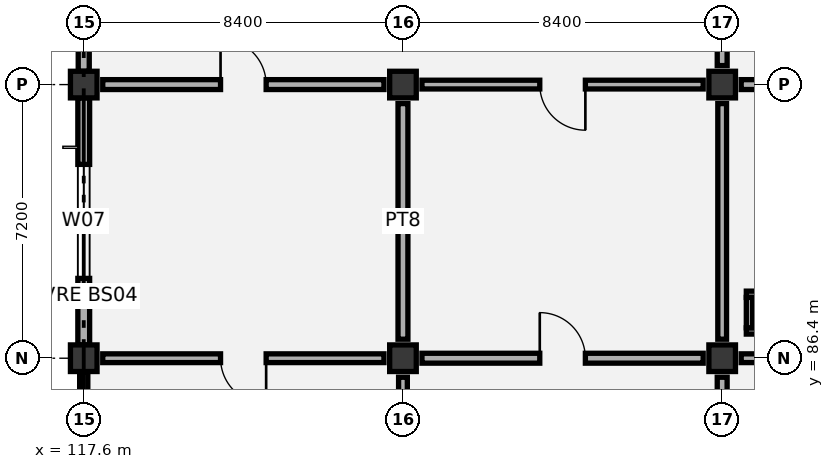
"""IFC4 building model, lengths in metres.
Left out: names, types, materials, properties, quantities, classifications, styles, units other than length and angle.
Written with IfcOpenShell. Run it as: python <this file> out.ifc"""

import sys

from ifc_helpers import new_model, si_unit, direction, frame, frame_2d, origin, origin_2d, place, context, subcontext, project, spatial, rectangle, extrude, element, fill, save


model = new_model("IFC4")
c1 = context("Model", 3, precision=1e-05, world=origin(), true_north=direction((0.0, 1.0)))
c2 = subcontext(c1, "Body", "Model", "MODEL_VIEW")
j1 = project(units=[si_unit("LENGTHUNIT", "METRE"), si_unit("PLANEANGLEUNIT", "RADIAN")], contexts=[c1])
p1 = place(None, origin())
s1 = spatial("IfcSite", under=j1, at=p1, CompositionType="ELEMENT")
p2 = place(p1, origin())
s2 = spatial("IfcBuilding", under=s1, at=p2, CompositionType="ELEMENT")
p3 = place(p2, origin())
s3 = spatial("IfcBuildingStorey", under=s2, at=p3, CompositionType="ELEMENT", Elevation=0.0)
for number, where, z_axis, x_axis in (
    (1, (117.6, 86.4, 0.0), (0.0, 0.0, 1.0), (1.0, 0.0, 0.0)),
    (2, (117.6, 93.6, 0.0), (0.0, 0.0, 1.0), (1.0, 0.0, 0.0)),
    (3, (126.0, 86.4, 0.0), (0.0, 0.0, 1.0), (1.0, 0.0, 0.0)),
    (4, (126.0, 93.6, 0.0), (0.0, 0.0, 1.0), (1.0, 0.0, 0.0)),
    (5, (134.4, 86.4, 0.0), (0.0, 0.0, 1.0), (1.0, 0.0, 0.0)),
    (6, (134.4, 93.6, 0.0), (0.0, 0.0, 1.0), (1.0, 0.0, 0.0)),
):
    element("IfcColumn", number, at=place(p3, frame(where, z_axis=z_axis, x_axis=x_axis)), inside=s3, PredefinedType="COLUMN", context=c2, shape_type="SweptSolid", body=[
        extrude(rectangle(XDim=0.7, YDim=0.7, at=origin_2d()), origin(), (0.0, 0.0, 1.0), 6.0),
    ])
p4 = place(p3, frame((117.6, 79.55, 0.0), z_axis=(0.0, 0.0, 1.0), x_axis=(0.0, 1.0, 0.0)))
e7 = element("IfcWall", 7, at=p4, inside=s3, PredefinedType="SOLIDWALL", context=c2, shape_type="SweptSolid", body=[
    extrude(rectangle(XDim=6.5, YDim=0.215, at=frame_2d((3.25, 0.0))), origin(), (0.0, 0.0, 1.0), 5.02),
])
p5 = place(p4, frame((0.967, 0.0, 0.9)))
e8 = element("IfcOpeningElement", 8, at=p5, cuts=e7, PredefinedType="OPENING", context=c2, shape_type="SweptSolid", body=[
    extrude(rectangle(XDim=1.8, YDim=2.1, at=frame_2d((0.9, 1.05))), frame((0.0, 0.117, 0.0), z_axis=(0.0, -1.0, 0.0), x_axis=(1.0, 0.0, 0.0)), (0.0, 0.0, 1.0), 0.235),
])
p6 = place(p4, frame((3.733, 0.0, 0.9)))
e9 = element("IfcOpeningElement", 9, at=p6, cuts=e7, PredefinedType="OPENING", context=c2, shape_type="SweptSolid", body=[
    extrude(rectangle(XDim=1.8, YDim=2.1, at=frame_2d((0.9, 1.05))), frame((0.0, 0.117, 0.0), z_axis=(0.0, -1.0, 0.0), x_axis=(1.0, 0.0, 0.0)), (0.0, 0.0, 1.0), 0.235),
])
p7 = place(p3, frame((117.6, 86.75, 0.0), z_axis=(0.0, 0.0, 1.0), x_axis=(0.0, 1.0, 0.0)))
e10 = element("IfcWall", 10, at=p7, inside=s3, PredefinedType="SOLIDWALL", context=c2, shape_type="SweptSolid", body=[
    extrude(rectangle(XDim=6.5, YDim=0.31, at=frame_2d((3.25, 0.0))), origin(), (0.0, 0.0, 1.0), 5.02),
])
p8 = place(p7, frame((1.75, 0.0, 0.9)))
e11 = element("IfcOpeningElement", 11, at=p8, cuts=e10, PredefinedType="OPENING", context=c2, shape_type="SweptSolid", body=[
    extrude(rectangle(XDim=3.0, YDim=2.1, at=frame_2d((1.5, 1.05))), frame((0.0, 0.165, 0.0), z_axis=(0.0, -1.0, 0.0), x_axis=(1.0, 0.0, 0.0)), (0.0, 0.0, 1.0), 0.33),
])
p9 = place(p3, frame((117.6, 93.95, 0.0), z_axis=(0.0, 0.0, 1.0), x_axis=(0.0, 1.0, 0.0)))
e12 = element("IfcWall", 12, at=p9, inside=s3, PredefinedType="SOLIDWALL", context=c2, shape_type="SweptSolid", body=[
    extrude(rectangle(XDim=6.5, YDim=0.29, at=frame_2d((3.25, 0.0))), origin(), (0.0, 0.0, 1.0), 5.12),
])
p10 = place(p9, frame((1.75, 0.0, 0.9)))
e13 = element("IfcOpeningElement", 13, at=p10, cuts=e12, PredefinedType="OPENING", context=c2, shape_type="SweptSolid", body=[
    extrude(rectangle(XDim=3.0, YDim=2.4, at=frame_2d((1.5, 1.2))), frame((0.0, 0.155, 0.0), z_axis=(0.0, -1.0, 0.0), x_axis=(1.0, 0.0, 0.0)), (0.0, 0.0, 1.0), 0.31),
])
for number, where, z_axis, x_axis in (
    (14, (135.035, 87.117, 0.0), (0.0, 0.0, 1.0), (1.0, 0.0, 0.0)),
    (15, (135.035, 88.083, 0.0), (0.0, 0.0, 1.0), (1.0, 0.0, 0.0)),
):
    element("IfcWall", number, at=place(p3, frame(where, z_axis=z_axis, x_axis=x_axis)), inside=s3, PredefinedType="PARTITIONING", context=c2, shape_type="SweptSolid", body=[
        extrude(rectangle(XDim=1.43, YDim=0.165, at=frame_2d((0.715, 0.0))), origin(), (0.0, 0.0, 1.0), 5.675),
    ])
p11 = place(p3, frame((135.117, 87.2, 0.0), z_axis=(0.0, 0.0, 1.0), x_axis=(0.0, 1.0, 0.0)))
e16 = element("IfcWall", 16, at=p11, inside=s3, PredefinedType="PARTITIONING", context=c2, shape_type="SweptSolid", body=[
    extrude(rectangle(XDim=0.8, YDim=0.165, at=frame_2d((0.4, 0.0))), origin(), (0.0, 0.0, 1.0), 5.675),
])
p12 = place(p3, frame((126.0, 79.7, 0.0), z_axis=(0.0, 0.0, 1.0), x_axis=(0.0, 1.0, 0.0)))
e17 = element("IfcWall", 17, at=p12, inside=s3, PredefinedType="PARTITIONING", context=c2, shape_type="SweptSolid", body=[
    extrude(rectangle(XDim=6.2, YDim=0.23, at=frame_2d((3.1, 0.0))), origin(), (0.0, 0.0, 1.0), 5.38),
])
p13 = place(p3, frame((118.1, 86.4, 0.0), z_axis=(0.0, 0.0, 1.0), x_axis=(1.0, 0.0, 0.0)))
e18 = element("IfcWall", 18, at=p13, inside=s3, PredefinedType="PARTITIONING", context=c2, shape_type="SweptSolid", body=[
    extrude(rectangle(XDim=7.4, YDim=0.23, at=frame_2d((3.7, 0.0))), origin(), (0.0, 0.0, 1.0), 4.87),
])
p14 = place(p13, frame((3.1, 0.0, 0.0)))
e19 = element("IfcOpeningElement", 19, at=p14, cuts=e18, PredefinedType="OPENING", context=c2, shape_type="SweptSolid", body=[
    extrude(rectangle(XDim=1.2, YDim=2.1, at=frame_2d((0.6, 1.05))), frame((0.0, 0.125, 0.0), z_axis=(0.0, -1.0, 0.0), x_axis=(1.0, 0.0, 0.0)), (0.0, 0.0, 1.0), 0.25),
])
p15 = place(p3, frame((126.0, 86.9, 0.0), z_axis=(0.0, 0.0, 1.0), x_axis=(0.0, 1.0, 0.0)))
e20 = element("IfcWall", 20, at=p15, inside=s3, PredefinedType="PARTITIONING", context=c2, shape_type="SweptSolid", body=[
    extrude(rectangle(XDim=6.2, YDim=0.26, at=frame_2d((3.1, 0.0))), origin(), (0.0, 0.0, 1.0), 4.92),
])
p16 = place(p3, frame((118.1, 93.6, 0.0), z_axis=(0.0, 0.0, 1.0), x_axis=(1.0, 0.0, 0.0)))
e21 = element("IfcWall", 21, at=p16, inside=s3, PredefinedType="PARTITIONING", context=c2, shape_type="SweptSolid", body=[
    extrude(rectangle(XDim=7.4, YDim=0.26, at=frame_2d((3.7, 0.0))), origin(), (0.0, 0.0, 1.0), 4.87),
])
p17 = place(p16, frame((3.1, 0.0, 0.0)))
e22 = element("IfcOpeningElement", 22, at=p17, cuts=e21, PredefinedType="OPENING", context=c2, shape_type="SweptSolid", body=[
    extrude(rectangle(XDim=1.2, YDim=2.1, at=frame_2d((0.6, 1.05))), frame((0.0, 0.14, 0.0), z_axis=(0.0, -1.0, 0.0), x_axis=(1.0, 0.0, 0.0)), (0.0, 0.0, 1.0), 0.28),
])
p18 = place(p3, frame((134.4, 79.7, 0.0), z_axis=(0.0, 0.0, 1.0), x_axis=(0.0, 1.0, 0.0)))
e23 = element("IfcWall", 23, at=p18, inside=s3, PredefinedType="PARTITIONING", context=c2, shape_type="SweptSolid", body=[
    extrude(rectangle(XDim=6.2, YDim=0.26, at=frame_2d((3.1, 0.0))), origin(), (0.0, 0.0, 1.0), 4.92),
])
p19 = place(p18, frame((2.5, 0.0, 0.0)))
e24 = element("IfcOpeningElement", 24, at=p19, cuts=e23, PredefinedType="OPENING", context=c2, shape_type="SweptSolid", body=[
    extrude(rectangle(XDim=1.2, YDim=2.1, at=frame_2d((0.6, 1.05))), frame((0.0, 0.14, 0.0), z_axis=(0.0, -1.0, 0.0), x_axis=(1.0, 0.0, 0.0)), (0.0, 0.0, 1.0), 0.28),
])
p20 = place(p3, frame((126.5, 86.4, 0.0), z_axis=(0.0, 0.0, 1.0), x_axis=(1.0, 0.0, 0.0)))
e25 = element("IfcWall", 25, at=p20, inside=s3, PredefinedType="PARTITIONING", context=c2, shape_type="SweptSolid", body=[
    extrude(rectangle(XDim=7.4, YDim=0.26, at=frame_2d((3.7, 0.0))), origin(), (0.0, 0.0, 1.0), 4.87),
])
p21 = place(p20, frame((3.1, 0.0, 0.0)))
e26 = element("IfcOpeningElement", 26, at=p21, cuts=e25, PredefinedType="OPENING", context=c2, shape_type="SweptSolid", body=[
    extrude(rectangle(XDim=1.2, YDim=2.1, at=frame_2d((0.6, 1.05))), frame((0.0, 0.14, 0.0), z_axis=(0.0, -1.0, 0.0), x_axis=(1.0, 0.0, 0.0)), (0.0, 0.0, 1.0), 0.28),
])
p22 = place(p3, frame((134.4, 86.9, 0.0), z_axis=(0.0, 0.0, 1.0), x_axis=(0.0, 1.0, 0.0)))
e27 = element("IfcWall", 27, at=p22, inside=s3, PredefinedType="PARTITIONING", context=c2, shape_type="SweptSolid", body=[
    extrude(rectangle(XDim=6.2, YDim=0.23, at=frame_2d((3.1, 0.0))), origin(), (0.0, 0.0, 1.0), 5.17),
])
p23 = place(p3, frame((126.5, 93.6, 0.0), z_axis=(0.0, 0.0, 1.0), x_axis=(1.0, 0.0, 0.0)))
e28 = element("IfcWall", 28, at=p23, inside=s3, PredefinedType="PARTITIONING", context=c2, shape_type="SweptSolid", body=[
    extrude(rectangle(XDim=7.4, YDim=0.23, at=frame_2d((3.7, 0.0))), origin(), (0.0, 0.0, 1.0), 4.87),
])
p24 = place(p23, frame((3.1, 0.0, 0.0)))
e29 = element("IfcOpeningElement", 29, at=p24, cuts=e28, PredefinedType="OPENING", context=c2, shape_type="SweptSolid", body=[
    extrude(rectangle(XDim=1.2, YDim=2.1, at=frame_2d((0.6, 1.05))), frame((0.0, 0.125, 0.0), z_axis=(0.0, -1.0, 0.0), x_axis=(1.0, 0.0, 0.0)), (0.0, 0.0, 1.0), 0.25),
])
p25 = place(p3, frame((134.4, 94.1, 0.0), z_axis=(0.0, 0.0, 1.0), x_axis=(0.0, 1.0, 0.0)))
e30 = element("IfcWall", 30, at=p25, inside=s3, PredefinedType="PARTITIONING", context=c2, shape_type="SweptSolid", body=[
    extrude(rectangle(XDim=6.2, YDim=0.26, at=frame_2d((3.1, 0.0))), origin(), (0.0, 0.0, 1.0), 5.02),
])
p26 = place(p3, frame((134.9, 86.4, 0.0), z_axis=(0.0, 0.0, 1.0), x_axis=(1.0, 0.0, 0.0)))
e31 = element("IfcWall", 31, at=p26, inside=s3, PredefinedType="PARTITIONING", context=c2, shape_type="SweptSolid", body=[
    extrude(rectangle(XDim=7.4, YDim=0.23, at=frame_2d((3.7, 0.0))), origin(), (0.0, 0.0, 1.0), 4.87),
])
p27 = place(p26, frame((3.1, 0.0, 0.0)))
e32 = element("IfcOpeningElement", 32, at=p27, cuts=e31, PredefinedType="OPENING", context=c2, shape_type="SweptSolid", body=[
    extrude(rectangle(XDim=1.2, YDim=2.1, at=frame_2d((0.6, 1.05))), frame((0.0, 0.125, 0.0), z_axis=(0.0, -1.0, 0.0), x_axis=(1.0, 0.0, 0.0)), (0.0, 0.0, 1.0), 0.25),
])
p28 = place(p3, frame((134.9, 93.6, 0.0), z_axis=(0.0, 0.0, 1.0), x_axis=(1.0, 0.0, 0.0)))
e33 = element("IfcWall", 33, at=p28, inside=s3, PredefinedType="PARTITIONING", context=c2, shape_type="SweptSolid", body=[
    extrude(rectangle(XDim=7.4, YDim=0.26, at=frame_2d((3.7, 0.0))), origin(), (0.0, 0.0, 1.0), 4.87),
])
p29 = place(p28, frame((3.1, 0.0, 0.0)))
e34 = element("IfcOpeningElement", 34, at=p29, cuts=e33, PredefinedType="OPENING", context=c2, shape_type="SweptSolid", body=[
    extrude(rectangle(XDim=1.2, YDim=2.1, at=frame_2d((0.6, 1.05))), frame((0.0, 0.14, 0.0), z_axis=(0.0, -1.0, 0.0), x_axis=(1.0, 0.0, 0.0)), (0.0, 0.0, 1.0), 0.28),
])
p30 = place(p8, origin())
e35 = element("IfcWindow", 35, at=p30, inside=s3, PartitioningType="SINGLE_PANEL", PredefinedType="WINDOW", context=c2, shape_type="SweptSolid", body=[
    extrude(rectangle(XDim=3.0, YDim=2.1, at=frame_2d((1.5, 1.05))), frame((0.0, 0.03, 0.0), z_axis=(0.0, -1.0, 0.0), x_axis=(1.0, 0.0, 0.0)), (0.0, 0.0, 1.0), 0.06),
])
fill(e11, e35)
p31 = place(p14, frame((1.2, 0.0, 0.0), z_axis=(0.0, 0.0, 1.0), x_axis=(-1.0, 0.0, 0.0)))
e36 = element("IfcDoor", 36, at=p31, inside=s3, OperationType="SINGLE_SWING_LEFT", PredefinedType="DOOR", context=c2, shape_type="SweptSolid", body=[
    extrude(rectangle(XDim=1.2, YDim=2.1, at=frame_2d((0.6, 1.05))), frame((0.0, 0.025, 0.0), z_axis=(0.0, -1.0, 0.0), x_axis=(1.0, 0.0, 0.0)), (0.0, 0.0, 1.0), 0.05),
])
fill(e19, e36)
p32 = place(p17, origin())
e37 = element("IfcDoor", 37, at=p32, inside=s3, OperationType="SINGLE_SWING_LEFT", PredefinedType="DOOR", context=c2, shape_type="SweptSolid", body=[
    extrude(rectangle(XDim=1.2, YDim=2.1, at=frame_2d((0.6, 1.05))), frame((0.0, 0.025, 0.0), z_axis=(0.0, -1.0, 0.0), x_axis=(1.0, 0.0, 0.0)), (0.0, 0.0, 1.0), 0.05),
])
fill(e22, e37)
p33 = place(p21, origin())
e38 = element("IfcDoor", 38, at=p33, inside=s3, OperationType="SINGLE_SWING_LEFT", PredefinedType="DOOR", context=c2, shape_type="SweptSolid", body=[
    extrude(rectangle(XDim=1.2, YDim=2.1, at=frame_2d((0.6, 1.05))), frame((0.0, 0.025, 0.0), z_axis=(0.0, -1.0, 0.0), x_axis=(1.0, 0.0, 0.0)), (0.0, 0.0, 1.0), 0.05),
])
fill(e26, e38)
p34 = place(p24, frame((1.2, 0.0, 0.0), z_axis=(0.0, 0.0, 1.0), x_axis=(-1.0, 0.0, 0.0)))
e39 = element("IfcDoor", 39, at=p34, inside=s3, OperationType="SINGLE_SWING_LEFT", PredefinedType="DOOR", context=c2, shape_type="SweptSolid", body=[
    extrude(rectangle(XDim=1.2, YDim=2.1, at=frame_2d((0.6, 1.05))), frame((0.0, 0.025, 0.0), z_axis=(0.0, -1.0, 0.0), x_axis=(1.0, 0.0, 0.0)), (0.0, 0.0, 1.0), 0.05),
])
fill(e29, e39)
save(model, sys.argv[1])
